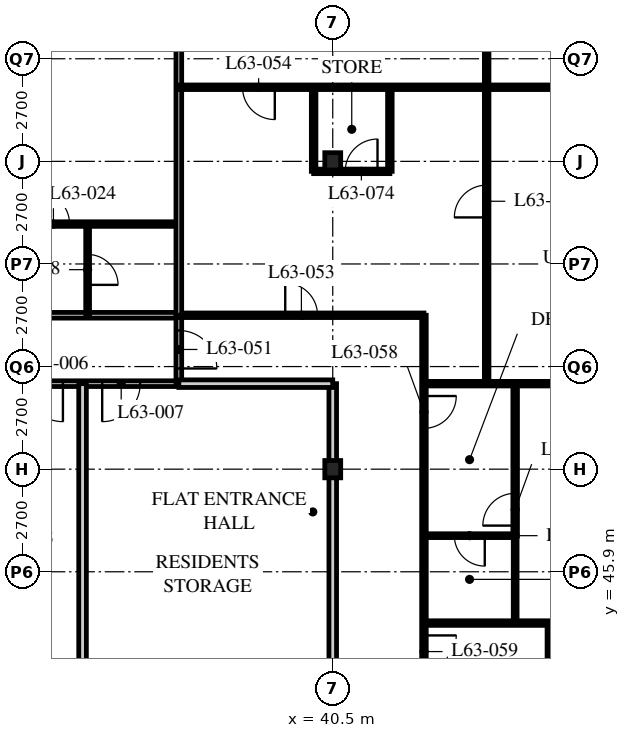
"""IFC4 building model, lengths in metres.
Left out: names, types, materials, properties, quantities, classifications, styles, units other than length and angle.
Written with IfcOpenShell. Run it as: python <this file> out.ifc"""

import sys

from ifc_helpers import new_model, si_unit, direction, frame, frame_2d, origin, origin_2d, place, context, subcontext, project, spatial, rectangle, i_section, extrude, element, fill, save


model = new_model("IFC4")
c1 = context("Model", 3, precision=1e-05, world=origin(), true_north=direction((0.0, 1.0)))
c2 = subcontext(c1, "Body", "Model", "MODEL_VIEW")
j1 = project(units=[si_unit("LENGTHUNIT", "METRE"), si_unit("PLANEANGLEUNIT", "RADIAN")], contexts=[c1])
p1 = place(None, origin())
s1 = spatial("IfcSite", under=j1, at=p1, CompositionType="ELEMENT")
p2 = place(p1, origin())
s2 = spatial("IfcBuilding", under=s1, at=p2, CompositionType="ELEMENT")
p3 = place(p2, frame((0.0, 0.0, 246.3)))
s3 = spatial("IfcBuildingStorey", under=s2, at=p3, CompositionType="ELEMENT", Elevation=246.3)
for number, where, z_axis, x_axis in (
    (1, (40.5, 48.6, 0.0), (0.0, 0.0, 1.0), (1.0, 0.0, 0.0)),
    (2, (40.5, 56.7, 0.0), (0.0, 0.0, 1.0), (1.0, 0.0, 0.0)),
):
    element("IfcColumn", number, at=place(p3, frame(where, z_axis=z_axis, x_axis=x_axis)), inside=s3, PredefinedType="COLUMN", context=c2, shape_type="SweptSolid", body=[
        extrude(i_section(OverallWidth=0.418, OverallDepth=0.456, WebThickness=0.042, FlangeThickness=0.067, FilletRadius=0.015, at=origin_2d()), origin(), (0.0, 0.0, 1.0), 3.9),
    ])
p4 = place(p3, frame((12.15, 52.65, 0.0), z_axis=(0.0, 0.0, 1.0), x_axis=(1.0, 0.0, 0.0)))
e3 = element("IfcWall", 3, at=p4, inside=s3, PredefinedType="PARTITIONING", context=c2, shape_type="SweptSolid", body=[
    extrude(rectangle(XDim=24.3, YDim=0.15, at=frame_2d((12.15, 0.0))), origin(), (0.0, 0.0, 1.0), 3.69),
])
p5 = place(p4, frame((4.45, 0.0, 0.0)))
e4 = element("IfcOpeningElement", 4, at=p5, cuts=e3, PredefinedType="OPENING", context=c2, shape_type="SweptSolid", body=[
    extrude(rectangle(XDim=1.0, YDim=2.1, at=frame_2d((0.5, 1.05))), frame((0.0, 0.085, 0.0), z_axis=(0.0, -1.0, 0.0), x_axis=(1.0, 0.0, 0.0)), (0.0, 0.0, 1.0), 0.17),
])
p6 = place(p4, frame((1.525, 0.0, 0.0)))
e5 = element("IfcOpeningElement", 5, at=p6, cuts=e3, PredefinedType="OPENING", context=c2, shape_type="SweptSolid", body=[
    extrude(rectangle(XDim=1.0, YDim=2.1, at=frame_2d((0.5, 1.05))), frame((0.0, 0.085, 0.0), z_axis=(0.0, -1.0, 0.0), x_axis=(1.0, 0.0, 0.0)), (0.0, 0.0, 1.0), 0.17),
])
p7 = place(p3, frame((29.56, 50.85, 0.0), z_axis=(0.0, 0.0, 1.0), x_axis=(1.0, 0.0, 0.0)))
e6 = element("IfcWall", 6, at=p7, inside=s3, PredefinedType="PARTITIONING", context=c2, shape_type="SweptSolid", body=[
    extrude(rectangle(XDim=6.89, YDim=0.15, at=frame_2d((3.445, 0.0))), origin(), (0.0, 0.0, 1.0), 3.69),
])
p8 = place(p7, frame((0.657, 0.0, 0.0)))
e7 = element("IfcOpeningElement", 7, at=p8, cuts=e6, PredefinedType="OPENING", context=c2, shape_type="SweptSolid", body=[
    extrude(rectangle(XDim=1.0, YDim=2.1, at=frame_2d((0.5, 1.05))), frame((0.0, 0.085, 0.0), z_axis=(0.0, -1.0, 0.0), x_axis=(1.0, 0.0, 0.0)), (0.0, 0.0, 1.0), 0.17),
])
p9 = place(p7, frame((2.84, 0.0, 0.0)))
e8 = element("IfcOpeningElement", 8, at=p9, cuts=e6, PredefinedType="OPENING", context=c2, shape_type="SweptSolid", body=[
    extrude(rectangle(XDim=1.0, YDim=2.1, at=frame_2d((0.5, 1.05))), frame((0.0, 0.085, 0.0), z_axis=(0.0, -1.0, 0.0), x_axis=(1.0, 0.0, 0.0)), (0.0, 0.0, 1.0), 0.17),
])
p10 = place(p7, frame((4.873, 0.0, 0.0)))
e9 = element("IfcOpeningElement", 9, at=p10, cuts=e6, PredefinedType="OPENING", context=c2, shape_type="SweptSolid", body=[
    extrude(rectangle(XDim=1.0, YDim=2.1, at=frame_2d((0.5, 1.05))), frame((0.0, 0.085, 0.0), z_axis=(0.0, -1.0, 0.0), x_axis=(1.0, 0.0, 0.0)), (0.0, 0.0, 1.0), 0.17),
])
p11 = place(p3, frame((33.917, 50.85, 0.0), z_axis=(0.0, 0.0, 1.0), x_axis=(0.0, -1.0, 0.0)))
e10 = element("IfcWall", 10, at=p11, inside=s3, PredefinedType="SOLIDWALL", context=c2, shape_type="SweptSolid", body=[
    extrude(rectangle(XDim=10.35, YDim=0.2, at=frame_2d((5.175, 0.0))), origin(), (0.0, 0.0, 1.0), 3.69),
])
p12 = place(p3, frame((36.45, 50.85, 0.0), z_axis=(0.0, 0.0, 1.0), x_axis=(0.0, 1.0, 0.0)))
e11 = element("IfcWall", 11, at=p12, inside=s3, PredefinedType="PARTITIONING", context=c2, shape_type="SweptSolid", body=[
    extrude(rectangle(XDim=1.8, YDim=0.15, at=frame_2d((0.9, 0.0))), origin(), (0.0, 0.0, 1.0), 3.69),
])
p13 = place(p12, frame((0.4, 0.0, 0.0)))
e12 = element("IfcOpeningElement", 12, at=p13, cuts=e11, PredefinedType="OPENING", context=c2, shape_type="SweptSolid", body=[
    extrude(rectangle(XDim=1.0, YDim=2.1, at=frame_2d((0.5, 1.05))), frame((0.0, 0.085, 0.0), z_axis=(0.0, -1.0, 0.0), x_axis=(1.0, 0.0, 0.0)), (0.0, 0.0, 1.0), 0.17),
])
p14 = place(p3, frame((40.5, 40.5, 0.0), z_axis=(0.0, 0.0, 1.0), x_axis=(0.0, 1.0, 0.0)))
e13 = element("IfcWall", 13, at=p14, inside=s3, PredefinedType="SOLIDWALL", context=c2, shape_type="SweptSolid", body=[
    extrude(rectangle(XDim=10.35, YDim=0.2, at=frame_2d((5.175, 0.0))), origin(), (0.0, 0.0, 1.0), 3.078),
])
p15 = place(p3, frame((34.05, 52.65, 0.0), z_axis=(0.0, 0.0, 1.0), x_axis=(0.0, 1.0, 0.0)))
e14 = element("IfcWall", 14, at=p15, inside=s3, PredefinedType="PARTITIONING", context=c2, shape_type="SweptSolid", body=[
    extrude(rectangle(XDim=2.4, YDim=0.1, at=frame_2d((1.2, 0.0))), origin(), (0.0, 0.0, 1.0), 3.69),
])
p16 = place(p15, frame((0.8, 0.0, 0.0)))
e15 = element("IfcOpeningElement", 15, at=p16, cuts=e14, PredefinedType="OPENING", context=c2, shape_type="SweptSolid", body=[
    extrude(rectangle(XDim=0.8, YDim=2.1, at=frame_2d((0.4, 1.05))), frame((0.0, 0.06, 0.0), z_axis=(0.0, -1.0, 0.0), x_axis=(1.0, 0.0, 0.0)), (0.0, 0.0, 1.0), 0.12),
])
p17 = place(p3, frame((8.15, 55.05, 0.0), z_axis=(0.0, 0.0, 1.0), x_axis=(1.0, 0.0, 0.0)))
e16 = element("IfcWall", 16, at=p17, inside=s3, PredefinedType="PARTITIONING", context=c2, shape_type="SweptSolid", body=[
    extrude(rectangle(XDim=28.3, YDim=0.12, at=frame_2d((14.15, 0.0))), origin(), (0.0, 0.0, 1.0), 3.69),
])
p18 = place(p17, frame((9.025, 0.0, 0.0)))
e17 = element("IfcOpeningElement", 17, at=p18, cuts=e16, PredefinedType="OPENING", context=c2, shape_type="SweptSolid", body=[
    extrude(rectangle(XDim=0.85, YDim=2.1, at=frame_2d((0.425, 1.05))), frame((0.0, 0.07, 0.0), z_axis=(0.0, -1.0, 0.0), x_axis=(1.0, 0.0, 0.0)), (0.0, 0.0, 1.0), 0.14),
])
p19 = place(p17, frame((16.475, 0.0, 0.0)))
e18 = element("IfcOpeningElement", 18, at=p19, cuts=e16, PredefinedType="OPENING", context=c2, shape_type="SweptSolid", body=[
    extrude(rectangle(XDim=0.85, YDim=2.1, at=frame_2d((0.425, 1.05))), frame((0.0, 0.07, 0.0), z_axis=(0.0, -1.0, 0.0), x_axis=(1.0, 0.0, 0.0)), (0.0, 0.0, 1.0), 0.14),
])
p20 = place(p17, frame((20.525, 0.0, 0.0)))
e19 = element("IfcOpeningElement", 19, at=p20, cuts=e16, PredefinedType="OPENING", context=c2, shape_type="SweptSolid", body=[
    extrude(rectangle(XDim=0.85, YDim=2.1, at=frame_2d((0.425, 1.05))), frame((0.0, 0.07, 0.0), z_axis=(0.0, -1.0, 0.0), x_axis=(1.0, 0.0, 0.0)), (0.0, 0.0, 1.0), 0.14),
])
p21 = place(p17, frame((24.575, 0.0, 0.0)))
e20 = element("IfcOpeningElement", 20, at=p21, cuts=e16, PredefinedType="OPENING", context=c2, shape_type="SweptSolid", body=[
    extrude(rectangle(XDim=0.85, YDim=2.1, at=frame_2d((0.425, 1.05))), frame((0.0, 0.07, 0.0), z_axis=(0.0, -1.0, 0.0), x_axis=(1.0, 0.0, 0.0)), (0.0, 0.0, 1.0), 0.14),
])
p22 = place(p17, frame((6.725, 0.0, 0.0)))
e21 = element("IfcOpeningElement", 21, at=p22, cuts=e16, PredefinedType="OPENING", context=c2, shape_type="SweptSolid", body=[
    extrude(rectangle(XDim=0.85, YDim=2.1, at=frame_2d((0.425, 1.05))), frame((0.0, 0.07, 0.0), z_axis=(0.0, -1.0, 0.0), x_axis=(1.0, 0.0, 0.0)), (0.0, 0.0, 1.0), 0.14),
])
p23 = place(p17, frame((2.875, 0.0, 0.0)))
e22 = element("IfcOpeningElement", 22, at=p23, cuts=e16, PredefinedType="OPENING", context=c2, shape_type="SweptSolid", body=[
    extrude(rectangle(XDim=0.85, YDim=2.1, at=frame_2d((0.425, 1.05))), frame((0.0, 0.07, 0.0), z_axis=(0.0, -1.0, 0.0), x_axis=(1.0, 0.0, 0.0)), (0.0, 0.0, 1.0), 0.14),
])
p24 = place(p3, frame((42.9, 52.65, 0.0), z_axis=(0.0, 0.0, 1.0), x_axis=(0.0, -1.0, 0.0)))
e23 = element("IfcWall", 23, at=p24, inside=s3, PredefinedType="PARTITIONING", context=c2, shape_type="SweptSolid", body=[
    extrude(rectangle(XDim=16.2, YDim=0.12, at=frame_2d((8.1, 0.0))), origin(), (0.0, 0.0, 1.0), 3.69),
])
p25 = place(p24, frame((2.125, 0.0, 0.0)))
e24 = element("IfcOpeningElement", 24, at=p25, cuts=e23, PredefinedType="OPENING", context=c2, shape_type="SweptSolid", body=[
    extrude(rectangle(XDim=0.85, YDim=2.1, at=frame_2d((0.425, 1.05))), frame((0.0, 0.07, 0.0), z_axis=(0.0, -1.0, 0.0), x_axis=(1.0, 0.0, 0.0)), (0.0, 0.0, 1.0), 0.14),
])
p26 = place(p24, frame((8.425, 0.0, 0.0)))
e25 = element("IfcOpeningElement", 25, at=p26, cuts=e23, PredefinedType="OPENING", context=c2, shape_type="SweptSolid", body=[
    extrude(rectangle(XDim=0.85, YDim=2.1, at=frame_2d((0.425, 1.05))), frame((0.0, 0.07, 0.0), z_axis=(0.0, -1.0, 0.0), x_axis=(1.0, 0.0, 0.0)), (0.0, 0.0, 1.0), 0.14),
])
p27 = place(p24, frame((12.475, 0.0, 0.0)))
e26 = element("IfcOpeningElement", 26, at=p27, cuts=e23, PredefinedType="OPENING", context=c2, shape_type="SweptSolid", body=[
    extrude(rectangle(XDim=0.85, YDim=2.1, at=frame_2d((0.425, 1.05))), frame((0.0, 0.07, 0.0), z_axis=(0.0, -1.0, 0.0), x_axis=(1.0, 0.0, 0.0)), (0.0, 0.0, 1.0), 0.14),
])
p28 = place(p3, frame((36.45, 52.65, 0.0), z_axis=(0.0, 0.0, 1.0), x_axis=(1.0, 0.0, 0.0)))
e27 = element("IfcWall", 27, at=p28, inside=s3, PredefinedType="PARTITIONING", context=c2, shape_type="SweptSolid", body=[
    extrude(rectangle(XDim=6.45, YDim=0.12, at=frame_2d((3.225, 0.0))), origin(), (0.0, 0.0, 1.0), 3.69),
])
p29 = place(p28, frame((2.8, 0.0, 0.0)))
e28 = element("IfcOpeningElement", 28, at=p29, cuts=e27, PredefinedType="OPENING", context=c2, shape_type="SweptSolid", body=[
    extrude(rectangle(XDim=0.85, YDim=2.1, at=frame_2d((0.425, 1.05))), frame((0.0, 0.07, 0.0), z_axis=(0.0, -1.0, 0.0), x_axis=(1.0, 0.0, 0.0)), (0.0, 0.0, 1.0), 0.14),
])
p30 = place(p3, frame((36.45, 50.85, 0.0), z_axis=(0.0, 0.0, 1.0), x_axis=(1.0, 0.0, 0.0)))
e29 = element("IfcWall", 29, at=p30, inside=s3, PredefinedType="SOLIDWALL", context=c2, shape_type="SweptSolid", body=[
    extrude(rectangle(XDim=4.05, YDim=0.2, at=frame_2d((2.025, 0.0))), origin(), (0.0, 0.0, 1.0), 3.69),
])
p31 = place(p3, frame((42.9, 50.85, 0.0), z_axis=(0.0, 0.0, 1.0), x_axis=(1.0, 0.0, 0.0)))
e30 = element("IfcWall", 30, at=p31, inside=s3, PredefinedType="PARTITIONING", context=c2, shape_type="SweptSolid", body=[
    extrude(rectangle(XDim=13.5, YDim=0.12, at=frame_2d((6.75, 0.0))), origin(), (0.0, 0.0, 1.0), 3.69),
])
p32 = place(p3, frame((36.45, 64.5, 0.0), z_axis=(0.0, 0.0, 1.0), x_axis=(0.0, -1.0, 0.0)))
e31 = element("IfcWall", 31, at=p32, inside=s3, PredefinedType="PARTITIONING", context=c2, shape_type="SweptSolid", body=[
    extrude(rectangle(XDim=11.85, YDim=0.15, at=frame_2d((5.925, 0.0))), origin(), (0.0, 0.0, 1.0), 3.69),
])
p33 = place(p3, frame((36.45, 58.65, 0.0), z_axis=(0.0, 0.0, 1.0), x_axis=(1.0, 0.0, 0.0)))
e32 = element("IfcWall", 32, at=p33, inside=s3, PredefinedType="PARTITIONING", context=c2, shape_type="SweptSolid", body=[
    extrude(rectangle(XDim=15.9, YDim=0.12, at=frame_2d((7.95, 0.0))), origin(), (0.0, 0.0, 1.0), 3.69),
])
p34 = place(p33, frame((1.675, 0.0, 0.0)))
e33 = element("IfcOpeningElement", 33, at=p34, cuts=e32, PredefinedType="OPENING", context=c2, shape_type="SweptSolid", body=[
    extrude(rectangle(XDim=0.85, YDim=2.1, at=frame_2d((0.425, 1.05))), frame((0.0, 0.07, 0.0), z_axis=(0.0, -1.0, 0.0), x_axis=(1.0, 0.0, 0.0)), (0.0, 0.0, 1.0), 0.14),
])
p35 = place(p3, frame((44.55, 64.5, 0.0), z_axis=(0.0, 0.0, 1.0), x_axis=(0.0, -1.0, 0.0)))
e34 = element("IfcWall", 34, at=p35, inside=s3, PredefinedType="PARTITIONING", context=c2, shape_type="SweptSolid", body=[
    extrude(rectangle(XDim=13.65, YDim=0.12, at=frame_2d((6.825, 0.0))), origin(), (0.0, 0.0, 1.0), 3.69),
])
p36 = place(p35, frame((8.425, 0.0, 0.0)))
e35 = element("IfcOpeningElement", 35, at=p36, cuts=e34, PredefinedType="OPENING", context=c2, shape_type="SweptSolid", body=[
    extrude(rectangle(XDim=0.85, YDim=2.1, at=frame_2d((0.425, 1.05))), frame((0.0, 0.07, 0.0), z_axis=(0.0, -1.0, 0.0), x_axis=(1.0, 0.0, 0.0)), (0.0, 0.0, 1.0), 0.14),
])
p37 = place(p35, frame((2.5, 0.0, 0.0)))
e36 = element("IfcOpeningElement", 36, at=p37, cuts=e34, PredefinedType="OPENING", context=c2, shape_type="SweptSolid", body=[
    extrude(rectangle(XDim=0.85, YDim=2.1, at=frame_2d((0.425, 1.05))), frame((0.0, 0.07, 0.0), z_axis=(0.0, -1.0, 0.0), x_axis=(1.0, 0.0, 0.0)), (0.0, 0.0, 1.0), 0.14),
])
p38 = place(p3, frame((42.9, 46.85, 0.0), z_axis=(0.0, 0.0, 1.0), x_axis=(1.0, 0.0, 0.0)))
e37 = element("IfcWall", 37, at=p38, inside=s3, PredefinedType="PARTITIONING", context=c2, shape_type="SweptSolid", body=[
    extrude(rectangle(XDim=2.4, YDim=0.1, at=frame_2d((1.2, 0.0))), origin(), (0.0, 0.0, 1.0), 3.69),
])
p39 = place(p38, frame((0.8, 0.0, 0.0)))
e38 = element("IfcOpeningElement", 38, at=p39, cuts=e37, PredefinedType="OPENING", context=c2, shape_type="SweptSolid", body=[
    extrude(rectangle(XDim=0.8, YDim=2.1, at=frame_2d((0.4, 1.05))), frame((0.0, 0.06, 0.0), z_axis=(0.0, -1.0, 0.0), x_axis=(1.0, 0.0, 0.0)), (0.0, 0.0, 1.0), 0.12),
])
p40 = place(p3, frame((45.3, 46.85, 0.0), z_axis=(0.0, 0.0, 1.0), x_axis=(0.0, -1.0, 0.0)))
e39 = element("IfcWall", 39, at=p40, inside=s3, PredefinedType="PARTITIONING", context=c2, shape_type="SweptSolid", body=[
    extrude(rectangle(XDim=2.3, YDim=0.1, at=frame_2d((1.15, 0.0))), origin(), (0.0, 0.0, 1.0), 3.69),
])
p41 = place(p3, frame((42.9, 44.55, 0.0), z_axis=(0.0, 0.0, 1.0), x_axis=(1.0, 0.0, 0.0)))
e40 = element("IfcWall", 40, at=p41, inside=s3, PredefinedType="PARTITIONING", context=c2, shape_type="SweptSolid", body=[
    extrude(rectangle(XDim=13.5, YDim=0.12, at=frame_2d((6.75, 0.0))), origin(), (0.0, 0.0, 1.0), 3.69),
])
p42 = place(p3, frame((45.3, 50.85, 0.0), z_axis=(0.0, 0.0, 1.0), x_axis=(0.0, -1.0, 0.0)))
e41 = element("IfcWall", 41, at=p42, inside=s3, PredefinedType="PARTITIONING", context=c2, shape_type="SweptSolid", body=[
    extrude(rectangle(XDim=4.01, YDim=0.12, at=frame_2d((2.005, 0.0))), origin(), (0.0, 0.0, 1.0), 3.69),
])
p43 = place(p42, frame((2.885, 0.0, 0.0)))
e42 = element("IfcOpeningElement", 42, at=p43, cuts=e41, PredefinedType="OPENING", context=c2, shape_type="SweptSolid", body=[
    extrude(rectangle(XDim=0.85, YDim=2.1, at=frame_2d((0.425, 1.05))), frame((0.0, 0.07, 0.0), z_axis=(0.0, -1.0, 0.0), x_axis=(1.0, 0.0, 0.0)), (0.0, 0.0, 1.0), 0.14),
])
p44 = place(p3, frame((46.2, 28.35, 0.0), z_axis=(0.0, 0.0, 1.0), x_axis=(0.0, 1.0, 0.0)))
e43 = element("IfcWall", 43, at=p44, inside=s3, PredefinedType="PARTITIONING", context=c2, shape_type="SweptSolid", body=[
    extrude(rectangle(XDim=16.2, YDim=0.12, at=frame_2d((8.1, 0.0))), origin(), (0.0, 0.0, 1.0), 3.69),
])
p45 = place(p44, frame((1.6, 0.0, 0.0)))
e44 = element("IfcOpeningElement", 44, at=p45, cuts=e43, PredefinedType="OPENING", context=c2, shape_type="SweptSolid", body=[
    extrude(rectangle(XDim=0.85, YDim=2.1, at=frame_2d((0.425, 1.05))), frame((0.0, 0.07, 0.0), z_axis=(0.0, -1.0, 0.0), x_axis=(1.0, 0.0, 0.0)), (0.0, 0.0, 1.0), 0.14),
])
p46 = place(p44, frame((5.65, 0.0, 0.0)))
e45 = element("IfcOpeningElement", 45, at=p46, cuts=e43, PredefinedType="OPENING", context=c2, shape_type="SweptSolid", body=[
    extrude(rectangle(XDim=0.85, YDim=2.1, at=frame_2d((0.425, 1.05))), frame((0.0, 0.07, 0.0), z_axis=(0.0, -1.0, 0.0), x_axis=(1.0, 0.0, 0.0)), (0.0, 0.0, 1.0), 0.14),
])
p47 = place(p44, frame((13.75, 0.0, 0.0)))
e46 = element("IfcOpeningElement", 46, at=p47, cuts=e43, PredefinedType="OPENING", context=c2, shape_type="SweptSolid", body=[
    extrude(rectangle(XDim=0.85, YDim=2.1, at=frame_2d((0.425, 1.05))), frame((0.0, 0.07, 0.0), z_axis=(0.0, -1.0, 0.0), x_axis=(1.0, 0.0, 0.0)), (0.0, 0.0, 1.0), 0.14),
])
p48 = place(p44, frame((9.7, 0.0, 0.0)))
e47 = element("IfcOpeningElement", 47, at=p48, cuts=e43, PredefinedType="OPENING", context=c2, shape_type="SweptSolid", body=[
    extrude(rectangle(XDim=0.85, YDim=2.1, at=frame_2d((0.425, 1.05))), frame((0.0, 0.07, 0.0), z_axis=(0.0, -1.0, 0.0), x_axis=(1.0, 0.0, 0.0)), (0.0, 0.0, 1.0), 0.14),
])
for number, where, z_axis, x_axis in (
    (48, (39.997, 58.65, 0.0), (0.0, 0.0, 1.0), (0.0, -1.0, 0.0)),
    (49, (42.003, 58.65, 0.0), (0.0, 0.0, 1.0), (0.0, -1.0, 0.0)),
):
    element("IfcWall", number, at=place(p3, frame(where, z_axis=z_axis, x_axis=x_axis)), inside=s3, PredefinedType="PARTITIONING", context=c2, shape_type="SweptSolid", body=[
        extrude(rectangle(XDim=2.213, YDim=0.12, at=frame_2d((1.106, 0.0))), origin(), (0.0, 0.0, 1.0), 3.69),
    ])
p49 = place(p3, frame((39.997, 56.437, 0.0), z_axis=(0.0, 0.0, 1.0), x_axis=(1.0, 0.0, 0.0)))
e50 = element("IfcWall", 50, at=p49, inside=s3, PredefinedType="PARTITIONING", context=c2, shape_type="SweptSolid", body=[
    extrude(rectangle(XDim=2.006, YDim=0.12, at=frame_2d((1.003, 0.0))), origin(), (0.0, 0.0, 1.0), 3.69),
])
p50 = place(p49, frame((0.831, 0.0, 0.0)))
e51 = element("IfcOpeningElement", 51, at=p50, cuts=e50, PredefinedType="OPENING", context=c2, shape_type="SweptSolid", body=[
    extrude(rectangle(XDim=0.85, YDim=2.1, at=frame_2d((0.425, 1.05))), frame((0.0, 0.07, 0.0), z_axis=(0.0, -1.0, 0.0), x_axis=(1.0, 0.0, 0.0)), (0.0, 0.0, 1.0), 0.14),
])
p51 = place(p9, origin())
e52 = element("IfcDoor", 52, at=p51, inside=s3, OperationType="SINGLE_SWING_LEFT", PredefinedType="DOOR", context=c2, shape_type="SweptSolid", body=[
    extrude(rectangle(XDim=1.0, YDim=2.1, at=frame_2d((0.5, 1.05))), frame((0.0, 0.025, 0.0), z_axis=(0.0, -1.0, 0.0), x_axis=(1.0, 0.0, 0.0)), (0.0, 0.0, 1.0), 0.05),
])
fill(e8, e52)
p52 = place(p10, origin())
e53 = element("IfcDoor", 53, at=p52, inside=s3, OperationType="SINGLE_SWING_RIGHT", PredefinedType="DOOR", context=c2, shape_type="SweptSolid", body=[
    extrude(rectangle(XDim=1.0, YDim=2.1, at=frame_2d((0.5, 1.05))), frame((0.0, 0.025, 0.0), z_axis=(0.0, -1.0, 0.0), x_axis=(1.0, 0.0, 0.0)), (0.0, 0.0, 1.0), 0.05),
])
fill(e9, e53)
p53 = place(p16, origin())
e54 = element("IfcDoor", 54, at=p53, inside=s3, OperationType="SINGLE_SWING_RIGHT", PredefinedType="DOOR", context=c2, shape_type="SweptSolid", body=[
    extrude(rectangle(XDim=0.8, YDim=2.1, at=frame_2d((0.4, 1.05))), frame((0.0, 0.025, 0.0), z_axis=(0.0, -1.0, 0.0), x_axis=(1.0, 0.0, 0.0)), (0.0, 0.0, 1.0), 0.05),
])
fill(e15, e54)
p54 = place(p21, origin())
e55 = element("IfcDoor", 55, at=p54, inside=s3, OperationType="SINGLE_SWING_LEFT", PredefinedType="DOOR", context=c2, shape_type="SweptSolid", body=[
    extrude(rectangle(XDim=0.85, YDim=2.1, at=frame_2d((0.425, 1.05))), frame((0.0, 0.025, 0.0), z_axis=(0.0, -1.0, 0.0), x_axis=(1.0, 0.0, 0.0)), (0.0, 0.0, 1.0), 0.05),
])
fill(e20, e55)
p55 = place(p13, origin())
e56 = element("IfcDoor", 56, at=p55, inside=s3, OperationType="SINGLE_SWING_RIGHT", PredefinedType="DOOR", context=c2, shape_type="SweptSolid", body=[
    extrude(rectangle(XDim=1.0, YDim=2.1, at=frame_2d((0.5, 1.05))), frame((0.0, 0.025, 0.0), z_axis=(0.0, -1.0, 0.0), x_axis=(1.0, 0.0, 0.0)), (0.0, 0.0, 1.0), 0.05),
])
fill(e12, e56)
p56 = place(p29, origin())
e57 = element("IfcDoor", 57, at=p56, inside=s3, OperationType="SINGLE_SWING_LEFT", PredefinedType="DOOR", context=c2, shape_type="SweptSolid", body=[
    extrude(rectangle(XDim=0.85, YDim=2.1, at=frame_2d((0.425, 1.05))), frame((0.0, 0.025, 0.0), z_axis=(0.0, -1.0, 0.0), x_axis=(1.0, 0.0, 0.0)), (0.0, 0.0, 1.0), 0.05),
])
fill(e28, e57)
p57 = place(p34, origin())
e58 = element("IfcDoor", 58, at=p57, inside=s3, OperationType="SINGLE_SWING_LEFT", PredefinedType="DOOR", context=c2, shape_type="SweptSolid", body=[
    extrude(rectangle(XDim=0.85, YDim=2.1, at=frame_2d((0.425, 1.05))), frame((0.0, 0.025, 0.0), z_axis=(0.0, -1.0, 0.0), x_axis=(1.0, 0.0, 0.0)), (0.0, 0.0, 1.0), 0.05),
])
fill(e33, e58)
p58 = place(p36, origin())
e59 = element("IfcDoor", 59, at=p58, inside=s3, OperationType="SINGLE_SWING_LEFT", PredefinedType="DOOR", context=c2, shape_type="SweptSolid", body=[
    extrude(rectangle(XDim=0.85, YDim=2.1, at=frame_2d((0.425, 1.05))), frame((0.0, 0.025, 0.0), z_axis=(0.0, -1.0, 0.0), x_axis=(1.0, 0.0, 0.0)), (0.0, 0.0, 1.0), 0.05),
])
fill(e35, e59)
p59 = place(p39, origin())
e60 = element("IfcDoor", 60, at=p59, inside=s3, OperationType="SINGLE_SWING_LEFT", PredefinedType="DOOR", context=c2, shape_type="SweptSolid", body=[
    extrude(rectangle(XDim=0.8, YDim=2.1, at=frame_2d((0.4, 1.05))), frame((0.0, 0.025, 0.0), z_axis=(0.0, -1.0, 0.0), x_axis=(1.0, 0.0, 0.0)), (0.0, 0.0, 1.0), 0.05),
])
fill(e38, e60)
p60 = place(p25, origin())
e61 = element("IfcDoor", 61, at=p60, inside=s3, OperationType="SINGLE_SWING_LEFT", PredefinedType="DOOR", context=c2, shape_type="SweptSolid", body=[
    extrude(rectangle(XDim=0.85, YDim=2.1, at=frame_2d((0.425, 1.05))), frame((0.0, 0.025, 0.0), z_axis=(0.0, -1.0, 0.0), x_axis=(1.0, 0.0, 0.0)), (0.0, 0.0, 1.0), 0.05),
])
fill(e24, e61)
p61 = place(p26, origin())
e62 = element("IfcDoor", 62, at=p61, inside=s3, OperationType="SINGLE_SWING_LEFT", PredefinedType="DOOR", context=c2, shape_type="SweptSolid", body=[
    extrude(rectangle(XDim=0.85, YDim=2.1, at=frame_2d((0.425, 1.05))), frame((0.0, 0.025, 0.0), z_axis=(0.0, -1.0, 0.0), x_axis=(1.0, 0.0, 0.0)), (0.0, 0.0, 1.0), 0.05),
])
fill(e25, e62)
p62 = place(p43, origin())
e63 = element("IfcDoor", 63, at=p62, inside=s3, OperationType="SINGLE_SWING_LEFT", PredefinedType="DOOR", context=c2, shape_type="SweptSolid", body=[
    extrude(rectangle(XDim=0.85, YDim=2.1, at=frame_2d((0.425, 1.05))), frame((0.0, 0.025, 0.0), z_axis=(0.0, -1.0, 0.0), x_axis=(1.0, 0.0, 0.0)), (0.0, 0.0, 1.0), 0.05),
])
fill(e42, e63)
p63 = place(p50, origin())
e64 = element("IfcDoor", 64, at=p63, inside=s3, OperationType="SINGLE_SWING_RIGHT", PredefinedType="DOOR", context=c2, shape_type="SweptSolid", body=[
    extrude(rectangle(XDim=0.85, YDim=2.1, at=frame_2d((0.425, 1.05))), frame((0.0, 0.025, 0.0), z_axis=(0.0, -1.0, 0.0), x_axis=(1.0, 0.0, 0.0)), (0.0, 0.0, 1.0), 0.05),
])
fill(e51, e64)
save(model, sys.argv[1])
